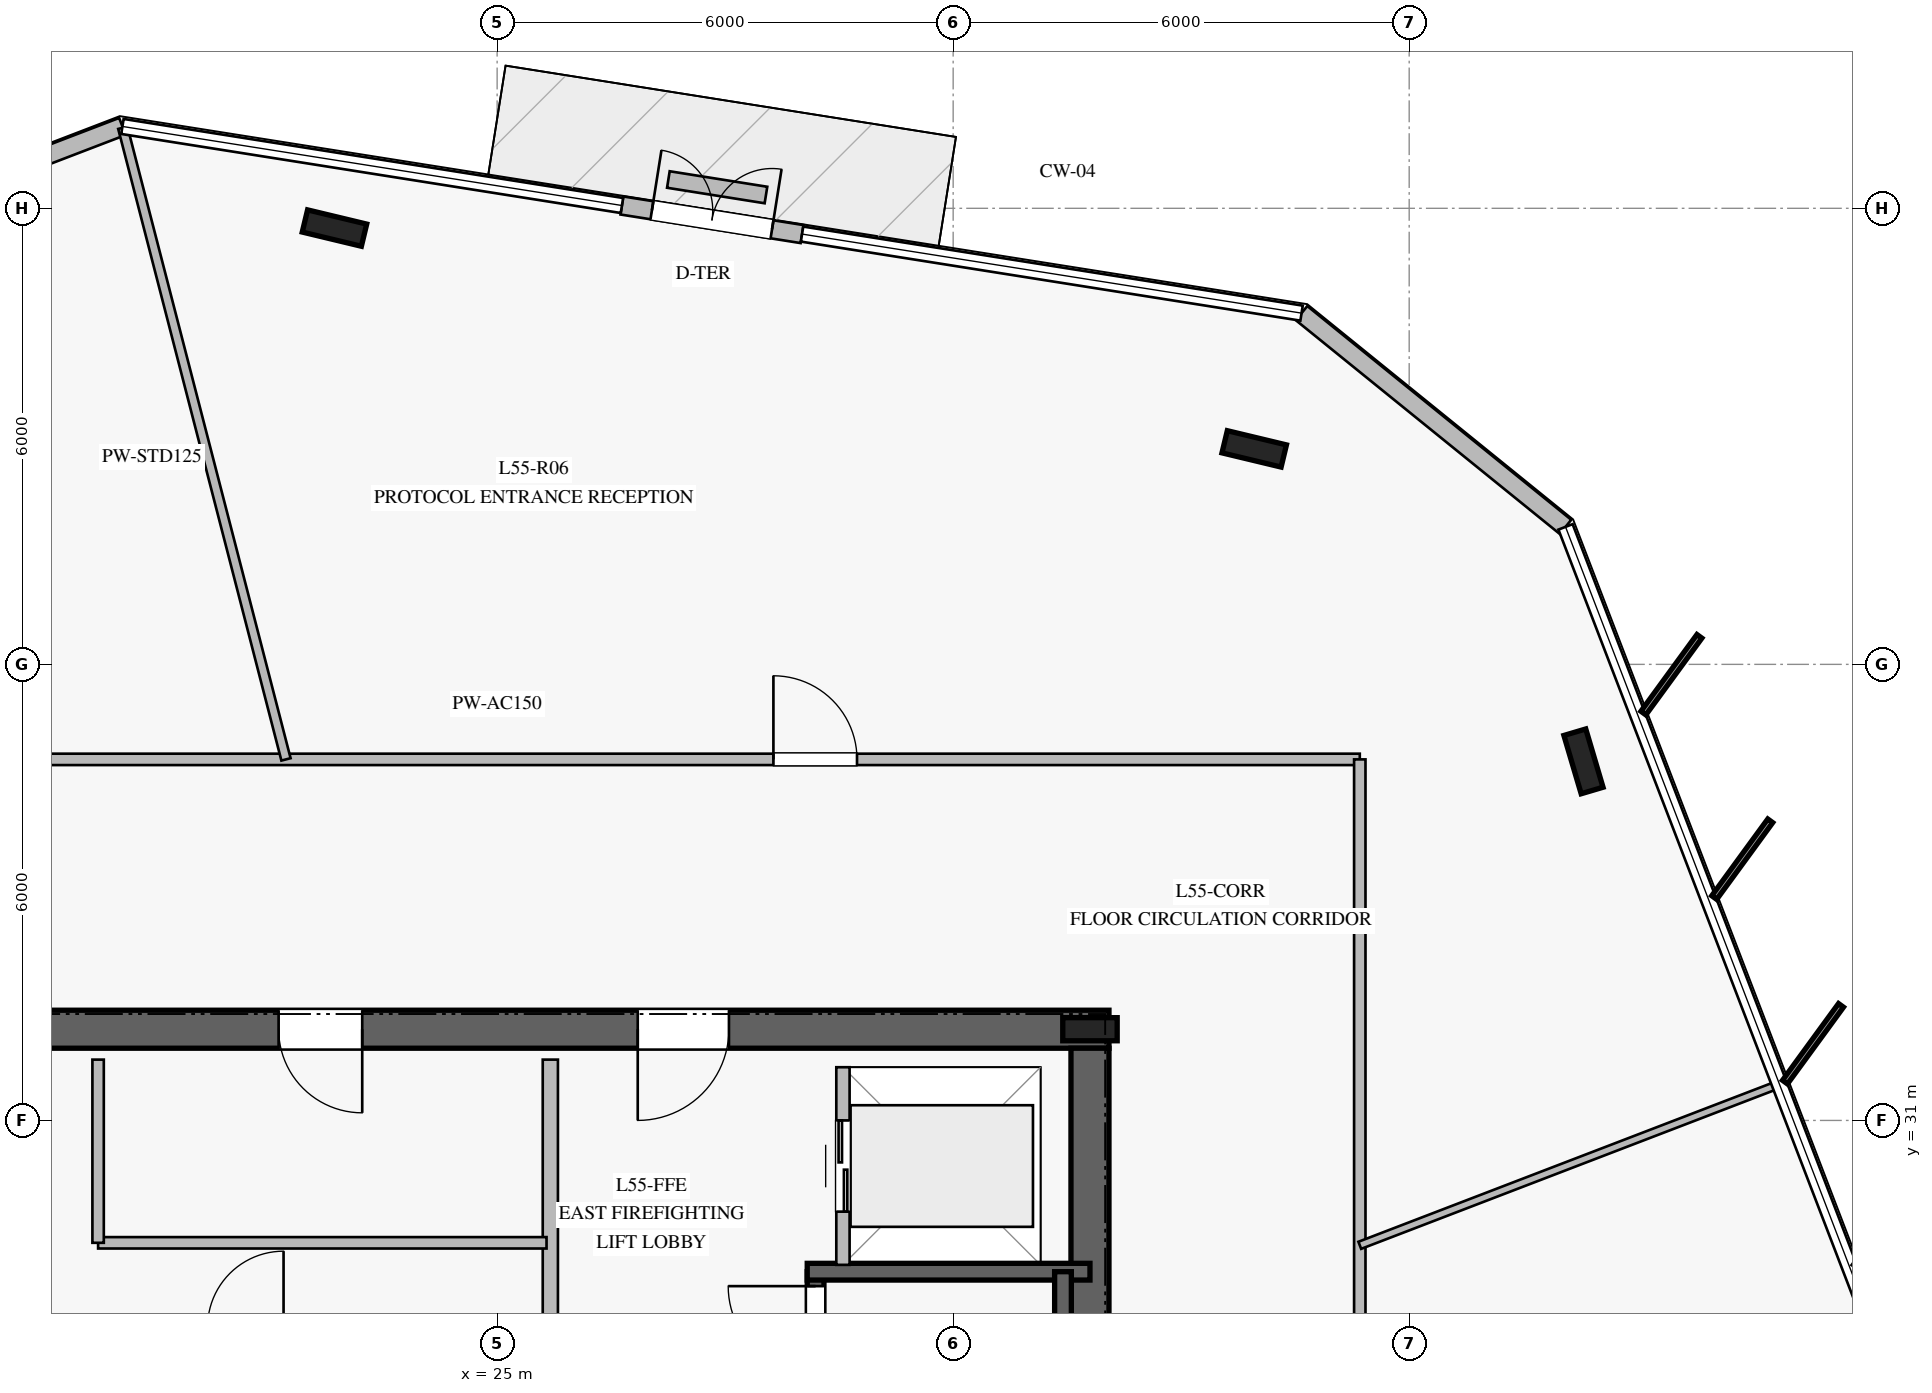
"""IFC4 building model, lengths in metres.
Left out: names, types, materials, properties, quantities, classifications, styles, units other than length and angle.
Written with IfcOpenShell. Run it as: python <this file> out.ifc"""

import sys

from ifc_helpers import new_model, si_unit, direction, frame, frame_2d, origin, origin_2d, place, context, subcontext, project, spatial, rectangle, i_section, extrude, element, fill, save


model = new_model("IFC4")
c1 = context("Model", 3, precision=1e-05, world=origin(), true_north=direction((0.0, 1.0)))
c2 = subcontext(c1, "Body", "Model", "MODEL_VIEW")
j1 = project(units=[si_unit("LENGTHUNIT", "METRE"), si_unit("PLANEANGLEUNIT", "RADIAN")], contexts=[c1])
p1 = place(None, origin())
s1 = spatial("IfcSite", under=j1, at=p1, CompositionType="ELEMENT")
p2 = place(p1, origin())
s2 = spatial("IfcBuilding", under=s1, at=p2, CompositionType="ELEMENT")
p3 = place(p2, frame((0.0, 0.0, 228.8)))
s3 = spatial("IfcBuildingStorey", under=s2, at=p3, CompositionType="ELEMENT", Elevation=228.8)
p4 = place(p3, frame((33.05, 32.2, 0.0), z_axis=(0.0, 0.0, 1.0), x_axis=(-1.0, 0.0, 0.0)))
e1 = element("IfcWall", 1, at=p4, inside=s3, PredefinedType="SHEAR", context=c2, shape_type="SweptSolid", body=[
    extrude(rectangle(XDim=16.1, YDim=0.5, at=frame_2d((8.05, 0.0))), origin(), (0.0, 0.0, 1.0), 3.78),
])
p5 = place(p4, frame((5.0, 0.0, 0.0)))
e2 = element("IfcOpeningElement", 2, at=p5, cuts=e1, PredefinedType="OPENING", context=c2, shape_type="SweptSolid", body=[
    extrude(rectangle(XDim=1.2, YDim=2.25, at=frame_2d((0.6, 1.125))), frame((0.0, 0.26, 0.0), z_axis=(0.0, -1.0, 0.0), x_axis=(1.0, 0.0, 0.0)), (0.0, 0.0, 1.0), 0.52),
])
p6 = place(p4, frame((9.825, 0.0, 0.0)))
e3 = element("IfcOpeningElement", 3, at=p6, cuts=e1, PredefinedType="OPENING", context=c2, shape_type="SweptSolid", body=[
    extrude(rectangle(XDim=1.1, YDim=2.2, at=frame_2d((0.55, 1.1))), frame((0.0, 0.26, 0.0), z_axis=(0.0, -1.0, 0.0), x_axis=(1.0, 0.0, 0.0)), (0.0, 0.0, 1.0), 0.52),
])
p7 = place(p3, frame((32.8, 18.05, 0.0), z_axis=(0.0, 0.0, 1.0), x_axis=(0.0, 1.0, 0.0)))
e4 = element("IfcWall", 4, at=p7, inside=s3, PredefinedType="SHEAR", context=c2, shape_type="SweptSolid", body=[
    extrude(rectangle(XDim=13.9, YDim=0.5, at=frame_2d((6.95, 0.0))), origin(), (0.0, 0.0, 1.0), 3.78),
])
p8 = place(p3, frame((32.8, 32.2, 0.0), z_axis=(0.0, 0.0, 1.0), x_axis=(1.0, 0.0, 0.0)))
e5 = element("IfcColumn", 5, at=p8, inside=s3, PredefinedType="COLUMN", context=c2, shape_type="SweptSolid", body=[
    extrude(i_section(OverallWidth=0.304, OverallDepth=0.716, WebThickness=0.021, FlangeThickness=0.04, at=origin_2d()), origin(), (0.0, 0.0, 1.0), 4.0),
])
p9 = place(p3, frame((29.19, 21.79, 0.0), z_axis=(0.0, 0.0, 1.0), x_axis=(0.0, 1.0, 0.0)))
e6 = element("IfcWall", 6, at=p9, inside=s3, PredefinedType="SOLIDWALL", context=c2, shape_type="SweptSolid", body=[
    extrude(rectangle(XDim=7.22, YDim=0.22, at=frame_2d((3.61, 0.0))), origin(), (0.0, 0.0, 1.0), 3.78),
])
p10 = place(p9, frame((5.88, 0.0, 0.0)))
e7 = element("IfcOpeningElement", 7, at=p10, cuts=e6, PredefinedType="OPENING", context=c2, shape_type="SweptSolid", body=[
    extrude(rectangle(XDim=1.15, YDim=2.2, at=frame_2d((0.575, 1.1))), frame((0.0, 0.12, 0.0), z_axis=(0.0, -1.0, 0.0), x_axis=(1.0, 0.0, 0.0)), (0.0, 0.0, 1.0), 0.24),
])
p11 = place(p3, frame((29.08, 29.01, 0.0), z_axis=(0.0, 0.0, 1.0), x_axis=(1.0, 0.0, 0.0)))
e8 = element("IfcWall", 8, at=p11, inside=s3, PredefinedType="SOLIDWALL", context=c2, shape_type="SweptSolid", body=[
    extrude(rectangle(XDim=3.72, YDim=0.22, at=frame_2d((1.86, 0.0))), origin(), (0.0, 0.0, 1.0), 3.78),
])
p12 = place(p3, frame((32.445, 29.01, 0.0), z_axis=(0.0, 0.0, 1.0), x_axis=(0.0, -1.0, 0.0)))
e9 = element("IfcWall", 9, at=p12, inside=s3, PredefinedType="SOLIDWALL", context=c2, shape_type="SweptSolid", body=[
    extrude(rectangle(XDim=7.22, YDim=0.22, at=frame_2d((3.61, 0.0))), origin(), (0.0, 0.0, 1.0), 3.78),
])
for number, where, z_axis, x_axis in (
    (10, (34.961, 39.835, 0.0), (0.0, 0.0, 1.0), (-0.972, 0.233, 0.0)),
    (11, (22.86, 42.74, 0.0), (0.0, 0.0, 1.0), (-0.972, 0.233, 0.0)),
    (12, (39.293, 35.724, 0.0), (0.0, 0.0, 1.0), (-0.284, 0.959, 0.0)),
):
    element("IfcColumn", number, at=place(p3, frame(where, z_axis=z_axis, x_axis=x_axis)), inside=s3, PredefinedType="COLUMN", context=c2, shape_type="SweptSolid", body=[
        extrude(i_section(OverallWidth=0.3, OverallDepth=0.8, WebThickness=0.018, FlangeThickness=0.033, at=origin_2d()), origin(), (0.0, 0.0, 1.0), 4.0),
    ])
p13 = place(p3, frame((29.012, 42.661, 0.0), z_axis=(0.0, 0.0, 1.0), x_axis=(-0.987632277634, 0.156788023059, 0.0)))
e13 = element("IfcWall", 13, at=p13, inside=s3, PredefinedType="STANDARD", context=c2, shape_type="SweptSolid", body=[
    extrude(rectangle(XDim=2.4, YDim=0.24, at=frame_2d((1.2, 0.0))), origin(), (0.0, 0.0, 1.0), 3.78),
])
p14 = place(p13, frame((0.4, 0.0, 0.0)))
e14 = element("IfcOpeningElement", 14, at=p14, cuts=e13, PredefinedType="OPENING", context=c2, shape_type="SweptSolid", body=[
    extrude(rectangle(XDim=1.6, YDim=2.25, at=frame_2d((0.8, 1.125))), frame((0.0, 0.13, 0.0), z_axis=(0.0, -1.0, 0.0), x_axis=(1.0, 0.0, 0.0)), (0.0, 0.0, 1.0), 0.26),
])
p15 = place(p3, frame((20.07, 44.077, 0.0), z_axis=(0.0, 0.0, 1.0), x_axis=(-0.933677607011, -0.358114682982, 0.0)))
e15 = element("IfcWall", 15, at=p15, inside=s3, PredefinedType="STANDARD", context=c2, shape_type="SweptSolid", body=[
    extrude(rectangle(XDim=4.468, YDim=0.24, at=frame_2d((2.234, 0.0))), origin(), (0.0, 0.0, 1.0), 3.78),
])
p16 = place(p3, frame((39.057, 38.809, 0.0), z_axis=(0.0, 0.0, 1.0), x_axis=(-0.777177433654, 0.629281524136, 0.0)))
e16 = element("IfcWall", 16, at=p16, inside=s3, PredefinedType="STANDARD", context=c2, shape_type="SweptSolid", body=[
    extrude(rectangle(XDim=4.469, YDim=0.24, at=frame_2d((2.234, 0.0))), origin(), (0.0, 0.0, 1.0), 3.78),
])
p17 = place(p3, frame((28.537, 43.175, 0.0), z_axis=(0.0, 0.0, 1.0), x_axis=(-0.98763322112, 0.156782079779, 0.0)))
e17 = element("IfcWall", 17, at=p17, inside=s3, PredefinedType="USERDEFINED", context=c2, shape_type="SweptSolid", body=[
    extrude(rectangle(XDim=1.3, YDim=0.22, at=frame_2d((0.65, 0.0))), origin(), (0.0, 0.0, 1.0), 0.4),
])
p18 = place(p3, frame((25.7, 26.65, 0.0), z_axis=(0.0, 0.0, 1.0), x_axis=(0.0, 1.0, 0.0)))
e18 = element("IfcWall", 18, at=p18, inside=s3, PredefinedType="PARTITIONING", context=c2, shape_type="SweptSolid", body=[
    extrude(rectangle(XDim=5.15, YDim=0.2, at=frame_2d((2.575, 0.0))), origin(), (0.0, 0.0, 1.0), 3.78),
])
p19 = place(p3, frame((19.75, 29.39, 0.0), z_axis=(0.0, 0.0, 1.0), x_axis=(1.0, 0.0, 0.0)))
e19 = element("IfcWall", 19, at=p19, inside=s3, PredefinedType="PARTITIONING", context=c2, shape_type="SweptSolid", body=[
    extrude(rectangle(XDim=5.9, YDim=0.15, at=frame_2d((2.95, 0.0))), origin(), (0.0, 0.0, 1.0), 3.78),
])
p20 = place(p3, frame((19.75, 29.39, 0.0), z_axis=(0.0, 0.0, 1.0), x_axis=(0.0, 1.0, 0.0)))
e20 = element("IfcWall", 20, at=p20, inside=s3, PredefinedType="PARTITIONING", context=c2, shape_type="SweptSolid", body=[
    extrude(rectangle(XDim=2.41, YDim=0.15, at=frame_2d((1.205, 0.0))), origin(), (0.0, 0.0, 1.0), 3.78),
])
p21 = place(p3, frame((29.55, 29.1, 0.0), z_axis=(0.0, 0.0, 1.0), x_axis=(0.0, 1.0, 0.0)))
e21 = element("IfcWall", 21, at=p21, inside=s3, PredefinedType="PARTITIONING", context=c2, shape_type="SweptSolid", body=[
    extrude(rectangle(XDim=2.6, YDim=0.175, at=frame_2d((1.3, 0.0))), origin(), (0.0, 0.0, 1.0), 3.78),
])
p22 = place(p21, frame((0.7, 0.0, 0.0)))
e22 = element("IfcOpeningElement", 22, at=p22, cuts=e21, PredefinedType="OPENING", context=c2, shape_type="SweptSolid", body=[
    extrude(rectangle(XDim=1.2, YDim=2.2, at=frame_2d((0.6, 1.1))), frame((0.0, 0.098, 0.0), z_axis=(0.0, -1.0, 0.0), x_axis=(1.0, 0.0, 0.0)), (0.0, 0.0, 1.0), 0.195),
])
p23 = place(p3, frame((13.65, 35.75, 0.0), z_axis=(0.0, 0.0, 1.0), x_axis=(1.0, 0.0, 0.0)))
e23 = element("IfcWall", 23, at=p23, inside=s3, PredefinedType="PARTITIONING", context=c2, shape_type="SweptSolid", body=[
    extrude(rectangle(XDim=22.7, YDim=0.15, at=frame_2d((11.35, 0.0))), origin(), (0.0, 0.0, 1.0), 3.05),
])
p24 = place(p23, frame((14.985, 0.0, 0.0)))
e24 = element("IfcOpeningElement", 24, at=p24, cuts=e23, PredefinedType="OPENING", context=c2, shape_type="SweptSolid", body=[
    extrude(rectangle(XDim=1.1, YDim=2.2, at=frame_2d((0.55, 1.1))), frame((0.0, 0.085, 0.0), z_axis=(0.0, -1.0, 0.0), x_axis=(1.0, 0.0, 0.0)), (0.0, 0.0, 1.0), 0.17),
])
p25 = place(p23, frame((3.91, 0.0, 0.0)))
e25 = element("IfcOpeningElement", 25, at=p25, cuts=e23, PredefinedType="OPENING", context=c2, shape_type="SweptSolid", body=[
    extrude(rectangle(XDim=1.1, YDim=2.2, at=frame_2d((0.55, 1.1))), frame((0.0, 0.085, 0.0), z_axis=(0.0, -1.0, 0.0), x_axis=(1.0, 0.0, 0.0)), (0.0, 0.0, 1.0), 0.17),
])
p26 = place(p3, frame((36.35, 35.75, 0.0), z_axis=(0.0, 0.0, 1.0), x_axis=(0.0, -1.0, 0.0)))
e26 = element("IfcWall", 26, at=p26, inside=s3, PredefinedType="PARTITIONING", context=c2, shape_type="SweptSolid", body=[
    extrude(rectangle(XDim=21.5, YDim=0.15, at=frame_2d((10.75, 0.0))), origin(), (0.0, 0.0, 1.0), 3.28),
])
p27 = place(p26, frame((18.877, 0.0, 0.0)))
e27 = element("IfcOpeningElement", 27, at=p27, cuts=e26, PredefinedType="OPENING", context=c2, shape_type="SweptSolid", body=[
    extrude(rectangle(XDim=1.1, YDim=2.2, at=frame_2d((0.55, 1.1))), frame((0.0, 0.085, 0.0), z_axis=(0.0, -1.0, 0.0), x_axis=(1.0, 0.0, 0.0)), (0.0, 0.0, 1.0), 0.17),
])
p28 = place(p26, frame((11.318, 0.0, 0.0)))
e28 = element("IfcOpeningElement", 28, at=p28, cuts=e26, PredefinedType="OPENING", context=c2, shape_type="SweptSolid", body=[
    extrude(rectangle(XDim=1.1, YDim=2.2, at=frame_2d((0.55, 1.1))), frame((0.0, 0.085, 0.0), z_axis=(0.0, -1.0, 0.0), x_axis=(1.0, 0.0, 0.0)), (0.0, 0.0, 1.0), 0.17),
])
p29 = place(p3, frame((22.222, 35.75, 0.0), z_axis=(0.0, 0.0, 1.0), x_axis=(-0.25014469809, 0.968208464132, 0.0)))
e29 = element("IfcWall", 29, at=p29, inside=s3, PredefinedType="PARTITIONING", context=c2, shape_type="SweptSolid", body=[
    extrude(rectangle(XDim=8.583, YDim=0.125, at=frame_2d((4.292, 0.0))), origin(), (0.0, 0.0, 1.0), 3.05),
])
p30 = place(p3, frame((36.35, 29.357, 0.0), z_axis=(0.0, 0.0, 1.0), x_axis=(0.933551363276, 0.358443652652, 0.0)))
e30 = element("IfcWall", 30, at=p30, inside=s3, PredefinedType="MOVABLE", context=c2, shape_type="SweptSolid", body=[
    extrude(rectangle(XDim=5.898, YDim=0.1, at=frame_2d((2.949, 0.0))), origin(), (0.0, 0.0, 1.0), 3.18),
])
p31 = place(p14, frame((1.6, 0.0, 0.0), z_axis=(0.0, 0.0, 1.0), x_axis=(-1.0, 0.0, 0.0)))
e31 = element("IfcDoor", 31, at=p31, inside=s3, OperationType="DOUBLE_DOOR_SINGLE_SWING", PredefinedType="DOOR", context=c2, shape_type="SweptSolid", body=[
    extrude(rectangle(XDim=1.6, YDim=2.25, at=frame_2d((0.8, 1.125))), frame((0.0, 0.025, 0.0), z_axis=(0.0, -1.0, 0.0), x_axis=(1.0, 0.0, 0.0)), (0.0, 0.0, 1.0), 0.05),
])
fill(e14, e31)
p32 = place(p10, origin())
e32 = element("IfcDoor", 32, at=p32, inside=s3, OperationType="SINGLE_SWING_RIGHT", PredefinedType="DOOR", context=c2, shape_type="SweptSolid", body=[
    extrude(rectangle(XDim=1.15, YDim=2.2, at=frame_2d((0.575, 1.1))), frame((0.0, 0.025, 0.0), z_axis=(0.0, -1.0, 0.0), x_axis=(1.0, 0.0, 0.0)), (0.0, 0.0, 1.0), 0.05),
])
fill(e7, e32)
p33 = place(p5, origin())
e33 = element("IfcDoor", 33, at=p33, inside=s3, OperationType="SINGLE_SWING_RIGHT", PredefinedType="DOOR", context=c2, shape_type="SweptSolid", body=[
    extrude(rectangle(XDim=1.2, YDim=2.25, at=frame_2d((0.6, 1.125))), frame((0.0, 0.025, 0.0), z_axis=(0.0, -1.0, 0.0), x_axis=(1.0, 0.0, 0.0)), (0.0, 0.0, 1.0), 0.05),
])
fill(e2, e33)
p34 = place(p6, origin())
e34 = element("IfcDoor", 34, at=p34, inside=s3, OperationType="SINGLE_SWING_LEFT", PredefinedType="DOOR", context=c2, shape_type="SweptSolid", body=[
    extrude(rectangle(XDim=1.1, YDim=2.2, at=frame_2d((0.55, 1.1))), frame((0.0, 0.025, 0.0), z_axis=(0.0, -1.0, 0.0), x_axis=(1.0, 0.0, 0.0)), (0.0, 0.0, 1.0), 0.05),
])
fill(e3, e34)
p35 = place(p22, origin())
e35 = element("IfcDoor", 35, at=p35, inside=s3, OperationType="DOUBLE_DOOR_SLIDING", PredefinedType="DOOR", context=c2, shape_type="SweptSolid", body=[
    extrude(rectangle(XDim=1.2, YDim=2.2, at=frame_2d((0.6, 1.1))), frame((0.0, 0.025, 0.0), z_axis=(0.0, -1.0, 0.0), x_axis=(1.0, 0.0, 0.0)), (0.0, 0.0, 1.0), 0.05),
])
fill(e22, e35)
p36 = place(p24, origin())
e36 = element("IfcDoor", 36, at=p36, inside=s3, OperationType="SINGLE_SWING_LEFT", PredefinedType="DOOR", context=c2, shape_type="SweptSolid", body=[
    extrude(rectangle(XDim=1.1, YDim=2.2, at=frame_2d((0.55, 1.1))), frame((0.0, 0.025, 0.0), z_axis=(0.0, -1.0, 0.0), x_axis=(1.0, 0.0, 0.0)), (0.0, 0.0, 1.0), 0.05),
])
fill(e24, e36)
save(model, sys.argv[1])
